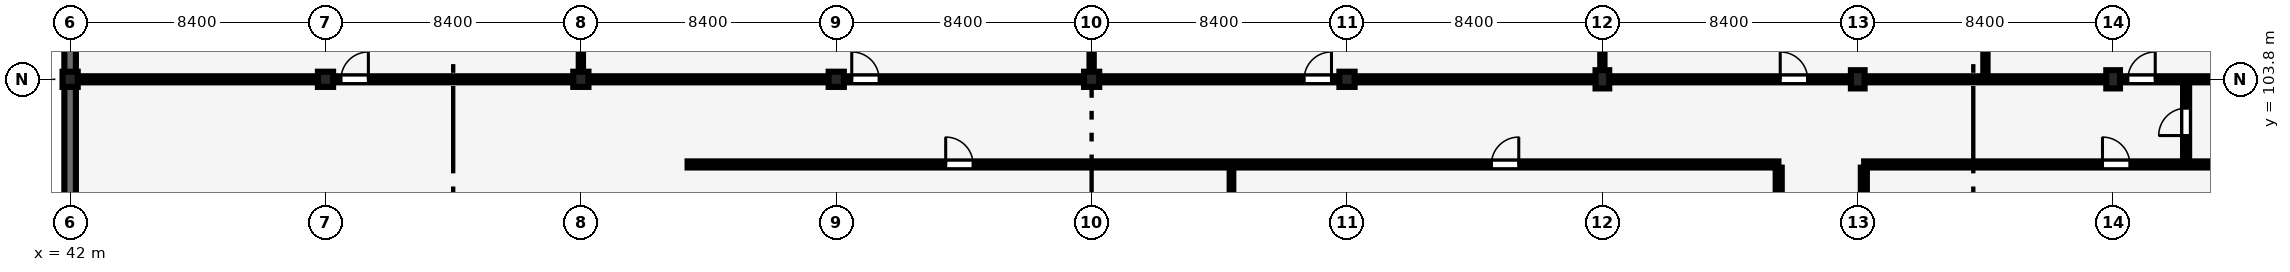
"""IFC4 building model, lengths in metres.
Left out: names, types, materials, properties, quantities, classifications, styles, units other than length and angle.
Written with IfcOpenShell. Run it as: python <this file> out.ifc"""

import sys

from ifc_helpers import new_model, si_unit, direction, frame, frame_2d, origin, origin_2d, place, context, subcontext, project, spatial, rectangle, extrude, element, fill, save


model = new_model("IFC4")
c1 = context("Model", 3, precision=1e-05, world=origin(), true_north=direction((0.0, 1.0)))
c2 = subcontext(c1, "Body", "Model", "MODEL_VIEW")
j1 = project(units=[si_unit("LENGTHUNIT", "METRE"), si_unit("PLANEANGLEUNIT", "RADIAN")], contexts=[c1])
p1 = place(None, origin())
s1 = spatial("IfcSite", under=j1, at=p1, CompositionType="ELEMENT")
p2 = place(p1, origin())
s2 = spatial("IfcBuilding", under=s1, at=p2, CompositionType="ELEMENT")
p3 = place(p2, frame((0.0, 0.0, 13.2)))
s3 = spatial("IfcBuildingStorey", under=s2, at=p3, CompositionType="ELEMENT", Elevation=13.2)
for number, where, z_axis, x_axis in (
    (1, (42.0, 103.8, 0.0), (0.0, 0.0, 1.0), (1.0, 0.0, 0.0)),
    (2, (50.4, 103.8, 0.0), (0.0, 0.0, 1.0), (1.0, 0.0, 0.0)),
    (3, (58.8, 103.8, 0.0), (0.0, 0.0, 1.0), (1.0, 0.0, 0.0)),
    (4, (67.2, 103.8, 0.0), (0.0, 0.0, 1.0), (1.0, 0.0, 0.0)),
    (5, (75.6, 103.8, 0.0), (0.0, 0.0, 1.0), (1.0, 0.0, 0.0)),
    (6, (84.0, 103.8, 0.0), (0.0, 0.0, 1.0), (1.0, 0.0, 0.0)),
):
    element("IfcColumn", number, at=place(p3, frame(where, z_axis=z_axis, x_axis=x_axis)), inside=s3, PredefinedType="COLUMN", context=c2, shape_type="SweptSolid", body=[
        extrude(rectangle(XDim=0.5, YDim=0.5, at=origin_2d()), origin(), (0.0, 0.0, 1.0), 4.2),
    ])
for number, where, z_axis, x_axis in (
    (7, (92.4, 103.8, 0.0), (0.0, 0.0, 1.0), (1.0, 0.0, 0.0)),
    (8, (100.8, 103.8, 0.0), (0.0, 0.0, 1.0), (1.0, 0.0, 0.0)),
    (9, (109.2, 103.8, 0.0), (0.0, 0.0, 1.0), (1.0, 0.0, 0.0)),
):
    element("IfcColumn", number, at=place(p3, frame(where, z_axis=z_axis, x_axis=x_axis)), inside=s3, PredefinedType="COLUMN", context=c2, shape_type="SweptSolid", body=[
        extrude(rectangle(XDim=0.45, YDim=0.6, at=origin_2d()), origin(), (0.0, 0.0, 1.0), 4.2),
    ])
p4 = place(p3, frame((42.0, 95.025, 0.0), z_axis=(0.0, 0.0, 1.0), x_axis=(0.0, 1.0, 0.0)))
e10 = element("IfcWall", 10, at=p4, inside=s3, PredefinedType="SHEAR", context=c2, shape_type="SweptSolid", body=[
    extrude(rectangle(XDim=8.55, YDim=0.38, at=frame_2d((4.275, 0.0))), origin(), (0.0, 0.0, 1.0), 3.01),
])
p5 = place(p3, frame((42.0, 104.025, 0.0), z_axis=(0.0, 0.0, 1.0), x_axis=(0.0, 1.0, 0.0)))
e11 = element("IfcWall", 11, at=p5, inside=s3, PredefinedType="SHEAR", context=c2, shape_type="SweptSolid", body=[
    extrude(rectangle(XDim=8.55, YDim=0.38, at=frame_2d((4.275, 0.0))), origin(), (0.0, 0.0, 1.0), 2.96),
])
p6 = place(p3, frame((111.6, 101.01, 0.0), z_axis=(0.0, 0.0, 1.0), x_axis=(0.0, 1.0, 0.0)))
e12 = element("IfcWall", 12, at=p6, inside=s3, PredefinedType="PARTITIONING", context=c2, shape_type="SweptSolid", body=[
    extrude(rectangle(XDim=2.78, YDim=0.2, at=frame_2d((1.39, 0.0))), origin(), (0.0, 0.0, 1.0), 3.9),
])
p7 = place(p6, frame((0.94, 0.0, 0.0)))
e13 = element("IfcOpeningElement", 13, at=p7, cuts=e12, PredefinedType="OPENING", context=c2, shape_type="SweptSolid", body=[
    extrude(rectangle(XDim=0.9, YDim=2.1, at=frame_2d((0.45, 1.05))), frame((0.0, 0.11, 0.0), z_axis=(0.0, -1.0, 0.0), x_axis=(1.0, 0.0, 0.0)), (0.0, 0.0, 1.0), 0.22),
])
p8 = place(p3, frame((58.8, 103.905, 0.0), z_axis=(0.0, 0.0, 1.0), x_axis=(0.0, 1.0, 0.0)))
e14 = element("IfcWall", 14, at=p8, inside=s3, PredefinedType="PARTITIONING", context=c2, shape_type="SweptSolid", body=[
    extrude(rectangle(XDim=8.79, YDim=0.14, at=frame_2d((4.395, 0.0))), origin(), (0.0, 0.0, 1.0), 3.01),
])
p9 = place(p3, frame((75.6, 103.905, 0.0), z_axis=(0.0, 0.0, 1.0), x_axis=(0.0, 1.0, 0.0)))
e15 = element("IfcWall", 15, at=p9, inside=s3, PredefinedType="PARTITIONING", context=c2, shape_type="SweptSolid", body=[
    extrude(rectangle(XDim=8.79, YDim=0.14, at=frame_2d((4.395, 0.0))), origin(), (0.0, 0.0, 1.0), 3.16),
])
p10 = place(p3, frame((92.4, 103.905, 0.0), z_axis=(0.0, 0.0, 1.0), x_axis=(0.0, 1.0, 0.0)))
e16 = element("IfcWall", 16, at=p10, inside=s3, PredefinedType="PARTITIONING", context=c2, shape_type="SweptSolid", body=[
    extrude(rectangle(XDim=8.79, YDim=0.14, at=frame_2d((4.395, 0.0))), origin(), (0.0, 0.0, 1.0), 3.48),
])
p11 = place(p3, frame((105.0, 103.905, 0.0), z_axis=(0.0, 0.0, 1.0), x_axis=(0.0, 1.0, 0.0)))
e17 = element("IfcWall", 17, at=p11, inside=s3, PredefinedType="PARTITIONING", context=c2, shape_type="SweptSolid", body=[
    extrude(rectangle(XDim=8.79, YDim=0.14, at=frame_2d((4.395, 0.0))), origin(), (0.0, 0.0, 1.0), 3.9),
])
p12 = place(p3, frame((42.195, 103.8, 0.0), z_axis=(0.0, 0.0, 1.0), x_axis=(1.0, 0.0, 0.0)))
e18 = element("IfcWall", 18, at=p12, inside=s3, PredefinedType="PARTITIONING", context=c2, shape_type="SweptSolid", body=[
    extrude(rectangle(XDim=7.945, YDim=0.2, at=frame_2d((3.972, 0.0))), origin(), (0.0, 0.0, 1.0), 3.31),
])
p13 = place(p3, frame((50.66, 103.8, 0.0), z_axis=(0.0, 0.0, 1.0), x_axis=(1.0, 0.0, 0.0)))
e19 = element("IfcWall", 19, at=p13, inside=s3, PredefinedType="PARTITIONING", context=c2, shape_type="SweptSolid", body=[
    extrude(rectangle(XDim=7.88, YDim=0.2, at=frame_2d((3.94, 0.0))), origin(), (0.0, 0.0, 1.0), 3.26),
])
p14 = place(p13, frame((0.25, 0.0, 0.0)))
e20 = element("IfcOpeningElement", 20, at=p14, cuts=e19, PredefinedType="OPENING", context=c2, shape_type="SweptSolid", body=[
    extrude(rectangle(XDim=0.9, YDim=2.1, at=frame_2d((0.45, 1.05))), frame((0.0, 0.11, 0.0), z_axis=(0.0, -1.0, 0.0), x_axis=(1.0, 0.0, 0.0)), (0.0, 0.0, 1.0), 0.22),
])
p15 = place(p3, frame((59.06, 103.8, 0.0), z_axis=(0.0, 0.0, 1.0), x_axis=(1.0, 0.0, 0.0)))
e21 = element("IfcWall", 21, at=p15, inside=s3, PredefinedType="PARTITIONING", context=c2, shape_type="SweptSolid", body=[
    extrude(rectangle(XDim=7.88, YDim=0.2, at=frame_2d((3.94, 0.0))), origin(), (0.0, 0.0, 1.0), 3.31),
])
p16 = place(p3, frame((67.46, 103.8, 0.0), z_axis=(0.0, 0.0, 1.0), x_axis=(1.0, 0.0, 0.0)))
e22 = element("IfcWall", 22, at=p16, inside=s3, PredefinedType="PARTITIONING", context=c2, shape_type="SweptSolid", body=[
    extrude(rectangle(XDim=7.88, YDim=0.2, at=frame_2d((3.94, 0.0))), origin(), (0.0, 0.0, 1.0), 3.26),
])
p17 = place(p16, frame((0.25, 0.0, 0.0)))
e23 = element("IfcOpeningElement", 23, at=p17, cuts=e22, PredefinedType="OPENING", context=c2, shape_type="SweptSolid", body=[
    extrude(rectangle(XDim=0.9, YDim=2.1, at=frame_2d((0.45, 1.05))), frame((0.0, 0.11, 0.0), z_axis=(0.0, -1.0, 0.0), x_axis=(1.0, 0.0, 0.0)), (0.0, 0.0, 1.0), 0.22),
])
p18 = place(p3, frame((75.86, 103.8, 0.0), z_axis=(0.0, 0.0, 1.0), x_axis=(1.0, 0.0, 0.0)))
e24 = element("IfcWall", 24, at=p18, inside=s3, PredefinedType="PARTITIONING", context=c2, shape_type="SweptSolid", body=[
    extrude(rectangle(XDim=7.88, YDim=0.2, at=frame_2d((3.94, 0.0))), origin(), (0.0, 0.0, 1.0), 3.21),
])
p19 = place(p18, frame((6.73, 0.0, 0.0)))
e25 = element("IfcOpeningElement", 25, at=p19, cuts=e24, PredefinedType="OPENING", context=c2, shape_type="SweptSolid", body=[
    extrude(rectangle(XDim=0.9, YDim=2.1, at=frame_2d((0.45, 1.05))), frame((0.0, 0.11, 0.0), z_axis=(0.0, -1.0, 0.0), x_axis=(1.0, 0.0, 0.0)), (0.0, 0.0, 1.0), 0.22),
])
p20 = place(p3, frame((84.26, 103.8, 0.0), z_axis=(0.0, 0.0, 1.0), x_axis=(1.0, 0.0, 0.0)))
e26 = element("IfcWall", 26, at=p20, inside=s3, PredefinedType="PARTITIONING", context=c2, shape_type="SweptSolid", body=[
    extrude(rectangle(XDim=7.905, YDim=0.2, at=frame_2d((3.953, 0.0))), origin(), (0.0, 0.0, 1.0), 3.43),
])
p21 = place(p3, frame((92.635, 103.8, 0.0), z_axis=(0.0, 0.0, 1.0), x_axis=(1.0, 0.0, 0.0)))
e27 = element("IfcWall", 27, at=p21, inside=s3, PredefinedType="PARTITIONING", context=c2, shape_type="SweptSolid", body=[
    extrude(rectangle(XDim=7.93, YDim=0.2, at=frame_2d((3.965, 0.0))), origin(), (0.0, 0.0, 1.0), 3.48),
])
p22 = place(p21, frame((5.615, 0.0, 0.0)))
e28 = element("IfcOpeningElement", 28, at=p22, cuts=e27, PredefinedType="OPENING", context=c2, shape_type="SweptSolid", body=[
    extrude(rectangle(XDim=0.9, YDim=2.1, at=frame_2d((0.45, 1.05))), frame((0.0, 0.11, 0.0), z_axis=(0.0, -1.0, 0.0), x_axis=(1.0, 0.0, 0.0)), (0.0, 0.0, 1.0), 0.22),
])
p23 = place(p3, frame((101.035, 103.8, 0.0), z_axis=(0.0, 0.0, 1.0), x_axis=(1.0, 0.0, 0.0)))
e29 = element("IfcWall", 29, at=p23, inside=s3, PredefinedType="PARTITIONING", context=c2, shape_type="SweptSolid", body=[
    extrude(rectangle(XDim=7.93, YDim=0.2, at=frame_2d((3.965, 0.0))), origin(), (0.0, 0.0, 1.0), 3.43),
])
p24 = place(p3, frame((109.435, 103.8, 0.0), z_axis=(0.0, 0.0, 1.0), x_axis=(1.0, 0.0, 0.0)))
e30 = element("IfcWall", 30, at=p24, inside=s3, PredefinedType="PARTITIONING", context=c2, shape_type="SweptSolid", body=[
    extrude(rectangle(XDim=7.97, YDim=0.2, at=frame_2d((3.985, 0.0))), origin(), (0.0, 0.0, 1.0), 3.48),
])
p25 = place(p24, frame((0.25, 0.0, 0.0)))
e31 = element("IfcOpeningElement", 31, at=p25, cuts=e30, PredefinedType="OPENING", context=c2, shape_type="SweptSolid", body=[
    extrude(rectangle(XDim=0.9, YDim=2.1, at=frame_2d((0.45, 1.05))), frame((0.0, 0.11, 0.0), z_axis=(0.0, -1.0, 0.0), x_axis=(1.0, 0.0, 0.0)), (0.0, 0.0, 1.0), 0.22),
])
p26 = place(p3, frame((80.2, 94.905, 0.0), z_axis=(0.0, 0.0, 1.0), x_axis=(0.0, 1.0, 0.0)))
e32 = element("IfcWall", 32, at=p26, inside=s3, PredefinedType="PARTITIONING", context=c2, shape_type="SweptSolid", body=[
    extrude(rectangle(XDim=5.99, YDim=0.12, at=frame_2d((2.995, 0.0))), origin(), (0.0, 0.0, 1.0), 3.9),
])
p27 = place(p3, frame((62.31, 101.0, 0.0), z_axis=(0.0, 0.0, 1.0), x_axis=(1.0, 0.0, 0.0)))
e33 = element("IfcWall", 33, at=p27, inside=s3, PredefinedType="PARTITIONING", context=c2, shape_type="SweptSolid", body=[
    extrude(rectangle(XDim=35.88, YDim=0.2, at=frame_2d((17.94, 0.0))), origin(), (0.0, 0.0, 1.0), 3.451),
])
p28 = place(p27, frame((8.49, 0.0, 0.0)))
e34 = element("IfcOpeningElement", 34, at=p28, cuts=e33, PredefinedType="OPENING", context=c2, shape_type="SweptSolid", body=[
    extrude(rectangle(XDim=0.9, YDim=2.1, at=frame_2d((0.45, 1.05))), frame((0.0, 0.11, 0.0), z_axis=(0.0, -1.0, 0.0), x_axis=(1.0, 0.0, 0.0)), (0.0, 0.0, 1.0), 0.22),
])
p29 = place(p27, frame((26.44, 0.0, 0.0)))
e35 = element("IfcOpeningElement", 35, at=p29, cuts=e33, PredefinedType="OPENING", context=c2, shape_type="SweptSolid", body=[
    extrude(rectangle(XDim=0.9, YDim=2.1, at=frame_2d((0.45, 1.05))), frame((0.0, 0.11, 0.0), z_axis=(0.0, -1.0, 0.0), x_axis=(1.0, 0.0, 0.0)), (0.0, 0.0, 1.0), 0.22),
])
p30 = place(p3, frame((98.2, 94.81, 0.0), z_axis=(0.0, 0.0, 1.0), x_axis=(0.0, 1.0, 0.0)))
e36 = element("IfcWall", 36, at=p30, inside=s3, PredefinedType="PARTITIONING", context=c2, shape_type="SweptSolid", body=[
    extrude(rectangle(XDim=6.085, YDim=0.2, at=frame_2d((3.042, 0.0))), origin(), (0.0, 0.0, 1.0), 3.9),
])
p31 = place(p3, frame((101.01, 101.0, 0.0), z_axis=(0.0, 0.0, 1.0), x_axis=(1.0, 0.0, 0.0)))
e37 = element("IfcWall", 37, at=p31, inside=s3, PredefinedType="PARTITIONING", context=c2, shape_type="SweptSolid", body=[
    extrude(rectangle(XDim=16.395, YDim=0.2, at=frame_2d((8.198, 0.0))), origin(), (0.0, 0.0, 1.0), 3.451),
])
p32 = place(p31, frame((7.84, 0.0, 0.0)))
e38 = element("IfcOpeningElement", 38, at=p32, cuts=e37, PredefinedType="OPENING", context=c2, shape_type="SweptSolid", body=[
    extrude(rectangle(XDim=0.9, YDim=2.1, at=frame_2d((0.45, 1.05))), frame((0.0, 0.11, 0.0), z_axis=(0.0, -1.0, 0.0), x_axis=(1.0, 0.0, 0.0)), (0.0, 0.0, 1.0), 0.22),
])
p33 = place(p3, frame((101.0, 95.11, 0.0), z_axis=(0.0, 0.0, 1.0), x_axis=(0.0, 1.0, 0.0)))
e39 = element("IfcWall", 39, at=p33, inside=s3, PredefinedType="PARTITIONING", context=c2, shape_type="SweptSolid", body=[
    extrude(rectangle(XDim=5.785, YDim=0.2, at=frame_2d((2.893, 0.0))), origin(), (0.0, 0.0, 1.0), 3.48),
])
p34 = place(p7, origin())
e40 = element("IfcDoor", 40, at=p34, inside=s3, OperationType="SINGLE_SWING_LEFT", PredefinedType="DOOR", context=c2, shape_type="SweptSolid", body=[
    extrude(rectangle(XDim=0.9, YDim=2.1, at=frame_2d((0.45, 1.05))), frame((0.0, 0.025, 0.0), z_axis=(0.0, -1.0, 0.0), x_axis=(1.0, 0.0, 0.0)), (0.0, 0.0, 1.0), 0.05),
])
fill(e13, e40)
p35 = place(p14, origin())
e41 = element("IfcDoor", 41, at=p35, inside=s3, OperationType="SINGLE_SWING_RIGHT", PredefinedType="DOOR", context=c2, shape_type="SweptSolid", body=[
    extrude(rectangle(XDim=0.9, YDim=2.1, at=frame_2d((0.45, 1.05))), frame((0.0, 0.025, 0.0), z_axis=(0.0, -1.0, 0.0), x_axis=(1.0, 0.0, 0.0)), (0.0, 0.0, 1.0), 0.05),
])
fill(e20, e41)
p36 = place(p17, origin())
e42 = element("IfcDoor", 42, at=p36, inside=s3, OperationType="SINGLE_SWING_LEFT", PredefinedType="DOOR", context=c2, shape_type="SweptSolid", body=[
    extrude(rectangle(XDim=0.9, YDim=2.1, at=frame_2d((0.45, 1.05))), frame((0.0, 0.025, 0.0), z_axis=(0.0, -1.0, 0.0), x_axis=(1.0, 0.0, 0.0)), (0.0, 0.0, 1.0), 0.05),
])
fill(e23, e42)
p37 = place(p19, origin())
e43 = element("IfcDoor", 43, at=p37, inside=s3, OperationType="SINGLE_SWING_RIGHT", PredefinedType="DOOR", context=c2, shape_type="SweptSolid", body=[
    extrude(rectangle(XDim=0.9, YDim=2.1, at=frame_2d((0.45, 1.05))), frame((0.0, 0.025, 0.0), z_axis=(0.0, -1.0, 0.0), x_axis=(1.0, 0.0, 0.0)), (0.0, 0.0, 1.0), 0.05),
])
fill(e25, e43)
p38 = place(p22, origin())
e44 = element("IfcDoor", 44, at=p38, inside=s3, OperationType="SINGLE_SWING_LEFT", PredefinedType="DOOR", context=c2, shape_type="SweptSolid", body=[
    extrude(rectangle(XDim=0.9, YDim=2.1, at=frame_2d((0.45, 1.05))), frame((0.0, 0.025, 0.0), z_axis=(0.0, -1.0, 0.0), x_axis=(1.0, 0.0, 0.0)), (0.0, 0.0, 1.0), 0.05),
])
fill(e28, e44)
p39 = place(p25, origin())
e45 = element("IfcDoor", 45, at=p39, inside=s3, OperationType="SINGLE_SWING_RIGHT", PredefinedType="DOOR", context=c2, shape_type="SweptSolid", body=[
    extrude(rectangle(XDim=0.9, YDim=2.1, at=frame_2d((0.45, 1.05))), frame((0.0, 0.025, 0.0), z_axis=(0.0, -1.0, 0.0), x_axis=(1.0, 0.0, 0.0)), (0.0, 0.0, 1.0), 0.05),
])
fill(e31, e45)
p40 = place(p28, origin())
e46 = element("IfcDoor", 46, at=p40, inside=s3, OperationType="SINGLE_SWING_LEFT", PredefinedType="DOOR", context=c2, shape_type="SweptSolid", body=[
    extrude(rectangle(XDim=0.9, YDim=2.1, at=frame_2d((0.45, 1.05))), frame((0.0, 0.025, 0.0), z_axis=(0.0, -1.0, 0.0), x_axis=(1.0, 0.0, 0.0)), (0.0, 0.0, 1.0), 0.05),
])
fill(e34, e46)
p41 = place(p29, origin())
e47 = element("IfcDoor", 47, at=p41, inside=s3, OperationType="SINGLE_SWING_RIGHT", PredefinedType="DOOR", context=c2, shape_type="SweptSolid", body=[
    extrude(rectangle(XDim=0.9, YDim=2.1, at=frame_2d((0.45, 1.05))), frame((0.0, 0.025, 0.0), z_axis=(0.0, -1.0, 0.0), x_axis=(1.0, 0.0, 0.0)), (0.0, 0.0, 1.0), 0.05),
])
fill(e35, e47)
p42 = place(p32, origin())
e48 = element("IfcDoor", 48, at=p42, inside=s3, OperationType="SINGLE_SWING_LEFT", PredefinedType="DOOR", context=c2, shape_type="SweptSolid", body=[
    extrude(rectangle(XDim=0.9, YDim=2.1, at=frame_2d((0.45, 1.05))), frame((0.0, 0.025, 0.0), z_axis=(0.0, -1.0, 0.0), x_axis=(1.0, 0.0, 0.0)), (0.0, 0.0, 1.0), 0.05),
])
fill(e38, e48)
save(model, sys.argv[1])
